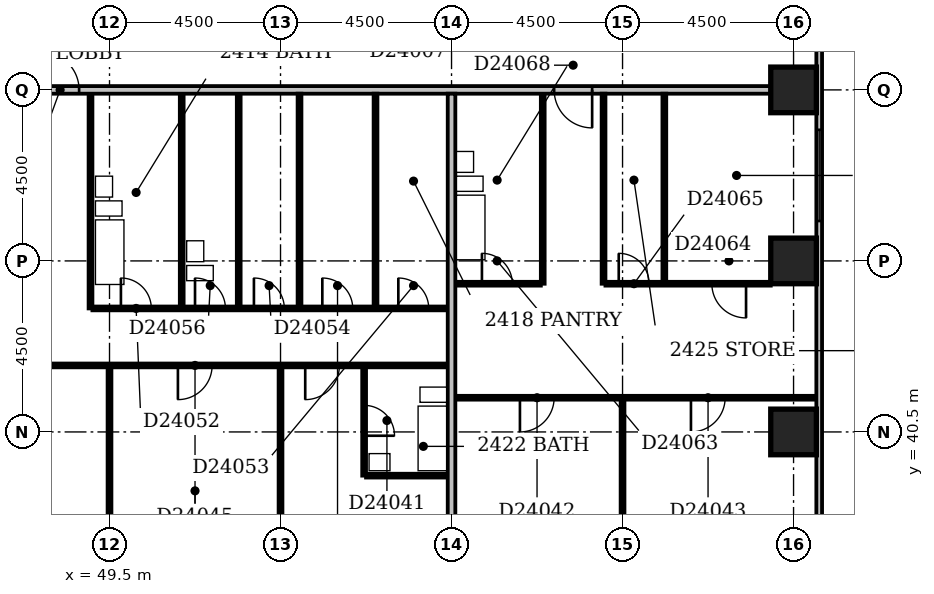
"""IFC4 building model, lengths in metres.
Left out: names, types, materials, properties, quantities, classifications, styles, units other than length and angle.
Written with IfcOpenShell. Run it as: python <this file> out.ifc"""

import sys

from ifc_helpers import new_model, si_unit, direction, frame, frame_2d, origin, origin_2d, place, context, subcontext, project, spatial, rectangle, extrude, element, fill, save


model = new_model("IFC4")
c1 = context("Model", 3, precision=1e-05, world=origin(), true_north=direction((0.0, 1.0)))
c2 = subcontext(c1, "Body", "Model", "MODEL_VIEW")
j1 = project(units=[si_unit("LENGTHUNIT", "METRE"), si_unit("PLANEANGLEUNIT", "RADIAN")], contexts=[c1])
p1 = place(None, origin())
s1 = spatial("IfcSite", under=j1, at=p1, CompositionType="ELEMENT")
p2 = place(p1, origin())
s2 = spatial("IfcBuilding", under=s1, at=p2, CompositionType="ELEMENT")
p3 = place(p2, frame((0.0, 0.0, 97.4)))
s3 = spatial("IfcBuildingStorey", under=s2, at=p3, CompositionType="ELEMENT", Elevation=97.4)
for number, where, z_axis, x_axis in (
    (1, (67.5, 40.5, -0.3), (0.0, 0.0, 1.0), (1.0, 0.0, 0.0)),
    (2, (67.5, 45.0, -0.3), (0.0, 0.0, 1.0), (1.0, 0.0, 0.0)),
    (3, (67.5, 49.5, -0.3), (0.0, 0.0, 1.0), (1.0, 0.0, 0.0)),
):
    element("IfcColumn", number, at=place(p3, frame(where, z_axis=z_axis, x_axis=x_axis)), inside=s3, PredefinedType="COLUMN", context=c2, shape_type="SweptSolid", body=[
        extrude(rectangle(XDim=1.2, YDim=1.2, at=origin_2d()), origin(), (0.0, 0.0, 1.0), 3.6),
    ])
p4 = place(p3, frame((68.175, 35.4, 0.0), z_axis=(0.0, 0.0, 1.0), x_axis=(0.0, 1.0, 0.0)))
e4 = element("IfcWall", 4, at=p4, inside=s3, PredefinedType="STANDARD", context=c2, shape_type="SweptSolid", body=[
    extrude(rectangle(XDim=23.85, YDim=0.15, at=frame_2d((11.925, 0.0))), origin(), (0.0, 0.0, 1.0), 2.7),
])
p5 = place(p4, frame((1.474, 0.0, 0.6)))
e5 = element("IfcOpeningElement", 5, at=p5, cuts=e4, PredefinedType="OPENING", context=c2, shape_type="SweptSolid", body=[
    extrude(rectangle(XDim=1.2, YDim=1.8, at=frame_2d((0.6, 0.9))), frame((0.0, 0.087, 0.0), z_axis=(0.0, -1.0, 0.0), x_axis=(1.0, 0.0, 0.0)), (0.0, 0.0, 1.0), 0.174),
])
p6 = place(p4, frame((10.65, 0.0, 0.6)))
e6 = element("IfcOpeningElement", 6, at=p6, cuts=e4, PredefinedType="OPENING", context=c2, shape_type="SweptSolid", body=[
    extrude(rectangle(XDim=2.4, YDim=1.8, at=frame_2d((1.2, 0.9))), frame((0.0, 0.087, 0.0), z_axis=(0.0, -1.0, 0.0), x_axis=(1.0, 0.0, 0.0)), (0.0, 0.0, 1.0), 0.174),
])
p7 = place(p4, frame((19.498, 0.0, 0.6)))
e7 = element("IfcOpeningElement", 7, at=p7, cuts=e4, PredefinedType="OPENING", context=c2, shape_type="SweptSolid", body=[
    extrude(rectangle(XDim=0.9, YDim=1.8, at=frame_2d((0.45, 0.9))), frame((0.0, 0.087, 0.0), z_axis=(0.0, -1.0, 0.0), x_axis=(1.0, 0.0, 0.0)), (0.0, 0.0, 1.0), 0.174),
])
p8 = place(p4, frame((21.806, 0.0, 0.6)))
e8 = element("IfcOpeningElement", 8, at=p8, cuts=e4, PredefinedType="OPENING", context=c2, shape_type="SweptSolid", body=[
    extrude(rectangle(XDim=0.45, YDim=1.8, at=frame_2d((0.225, 0.9))), frame((0.0, 0.087, 0.0), z_axis=(0.0, -1.0, 0.0), x_axis=(1.0, 0.0, 0.0)), (0.0, 0.0, 1.0), 0.174),
])
p9 = place(p3, frame((49.5, 36.6, 0.0), z_axis=(0.0, 0.0, 1.0), x_axis=(0.0, 1.0, 0.0)))
e9 = element("IfcWall", 9, at=p9, inside=s3, PredefinedType="PARTITIONING", context=c2, shape_type="SweptSolid", body=[
    extrude(rectangle(XDim=5.6, YDim=0.1, at=frame_2d((2.8, 0.0))), origin(), (0.0, 0.0, 1.0), 3.3),
])
p10 = place(p3, frame((54.0, 36.6, 0.0), z_axis=(0.0, 0.0, 1.0), x_axis=(0.0, 1.0, 0.0)))
e10 = element("IfcWall", 10, at=p10, inside=s3, PredefinedType="PARTITIONING", context=c2, shape_type="SweptSolid", body=[
    extrude(rectangle(XDim=5.6, YDim=0.1, at=frame_2d((2.8, 0.0))), origin(), (0.0, 0.0, 1.0), 2.6),
])
p11 = place(p3, frame((58.5, 36.6, 0.0), z_axis=(0.0, 0.0, 1.0), x_axis=(0.0, 1.0, 0.0)))
e11 = element("IfcWall", 11, at=p11, inside=s3, PredefinedType="PARTITIONING", context=c2, shape_type="SweptSolid", body=[
    extrude(rectangle(XDim=12.8, YDim=0.2, at=frame_2d((6.4, 0.0))), origin(), (0.0, 0.0, 1.0), 3.3),
])
p12 = place(p3, frame((63.0, 36.6, 0.0), z_axis=(0.0, 0.0, 1.0), x_axis=(0.0, 1.0, 0.0)))
e12 = element("IfcWall", 12, at=p12, inside=s3, PredefinedType="PARTITIONING", context=c2, shape_type="SweptSolid", body=[
    extrude(rectangle(XDim=4.75, YDim=0.1, at=frame_2d((2.375, 0.0))), origin(), (0.0, 0.0, 1.0), 2.4),
])
p13 = place(p3, frame((56.2, 39.35, 0.0), z_axis=(0.0, 0.0, 1.0), x_axis=(0.0, 1.0, 0.0)))
e13 = element("IfcWall", 13, at=p13, inside=s3, PredefinedType="PLUMBINGWALL", context=c2, shape_type="SweptSolid", body=[
    extrude(rectangle(XDim=2.85, YDim=0.1, at=frame_2d((1.425, 0.0))), origin(), (0.0, 0.0, 1.0), 3.3),
])
p14 = place(p13, frame((1.05, 0.0, 0.0)))
e14 = element("IfcOpeningElement", 14, at=p14, cuts=e13, PredefinedType="OPENING", context=c2, shape_type="SweptSolid", body=[
    extrude(rectangle(XDim=0.8, YDim=2.1, at=frame_2d((0.4, 1.05))), frame((0.0, 0.062, 0.0), z_axis=(0.0, -1.0, 0.0), x_axis=(1.0, 0.0, 0.0)), (0.0, 0.0, 1.0), 0.124),
])
p15 = place(p3, frame((56.25, 39.35, 0.0), z_axis=(0.0, 0.0, 1.0), x_axis=(1.0, 0.0, 0.0)))
e15 = element("IfcWall", 15, at=p15, inside=s3, PredefinedType="PLUMBINGWALL", context=c2, shape_type="SweptSolid", body=[
    extrude(rectangle(XDim=2.15, YDim=0.1, at=frame_2d((1.075, 0.0))), origin(), (0.0, 0.0, 1.0), 3.3),
])
p16 = place(p3, frame((58.6, 41.4, 0.0), z_axis=(0.0, 0.0, 1.0), x_axis=(1.0, 0.0, 0.0)))
e16 = element("IfcWall", 16, at=p16, inside=s3, PredefinedType="PARTITIONING", context=c2, shape_type="SweptSolid", body=[
    extrude(rectangle(XDim=9.5, YDim=0.1, at=frame_2d((4.75, 0.0))), origin(), (0.0, 0.0, 1.0), 3.3),
])
p17 = place(p16, frame((1.7, 0.0, 0.0)))
e17 = element("IfcOpeningElement", 17, at=p17, cuts=e16, PredefinedType="OPENING", context=c2, shape_type="SweptSolid", body=[
    extrude(rectangle(XDim=0.9, YDim=2.1, at=frame_2d((0.45, 1.05))), frame((0.0, 0.062, 0.0), z_axis=(0.0, -1.0, 0.0), x_axis=(1.0, 0.0, 0.0)), (0.0, 0.0, 1.0), 0.124),
])
p18 = place(p16, frame((6.2, 0.0, 0.0)))
e18 = element("IfcOpeningElement", 18, at=p18, cuts=e16, PredefinedType="OPENING", context=c2, shape_type="SweptSolid", body=[
    extrude(rectangle(XDim=0.9, YDim=2.1, at=frame_2d((0.45, 1.05))), frame((0.0, 0.062, 0.0), z_axis=(0.0, -1.0, 0.0), x_axis=(1.0, 0.0, 0.0)), (0.0, 0.0, 1.0), 0.124),
])
p19 = place(p3, frame((40.6, 42.25, 0.0), z_axis=(0.0, 0.0, 1.0), x_axis=(1.0, 0.0, 0.0)))
e19 = element("IfcWall", 19, at=p19, inside=s3, PredefinedType="PARTITIONING", context=c2, shape_type="SweptSolid", body=[
    extrude(rectangle(XDim=17.8, YDim=0.1, at=frame_2d((8.9, 0.0))), origin(), (0.0, 0.0, 1.0), 3.3),
])
p20 = place(p19, frame((3.9, 0.0, 0.0)))
e20 = element("IfcOpeningElement", 20, at=p20, cuts=e19, PredefinedType="OPENING", context=c2, shape_type="SweptSolid", body=[
    extrude(rectangle(XDim=0.9, YDim=2.1, at=frame_2d((0.45, 1.05))), frame((0.0, 0.062, 0.0), z_axis=(0.0, -1.0, 0.0), x_axis=(1.0, 0.0, 0.0)), (0.0, 0.0, 1.0), 0.124),
])
p21 = place(p19, frame((10.7, 0.0, 0.0)))
e21 = element("IfcOpeningElement", 21, at=p21, cuts=e19, PredefinedType="OPENING", context=c2, shape_type="SweptSolid", body=[
    extrude(rectangle(XDim=0.9, YDim=2.1, at=frame_2d((0.45, 1.05))), frame((0.0, 0.062, 0.0), z_axis=(0.0, -1.0, 0.0), x_axis=(1.0, 0.0, 0.0)), (0.0, 0.0, 1.0), 0.124),
])
p22 = place(p19, frame((14.05, 0.0, 0.0)))
e22 = element("IfcOpeningElement", 22, at=p22, cuts=e19, PredefinedType="OPENING", context=c2, shape_type="SweptSolid", body=[
    extrude(rectangle(XDim=0.9, YDim=2.1, at=frame_2d((0.45, 1.05))), frame((0.0, 0.062, 0.0), z_axis=(0.0, -1.0, 0.0), x_axis=(1.0, 0.0, 0.0)), (0.0, 0.0, 1.0), 0.124),
])
p23 = place(p3, frame((49.0, 43.75, 0.0), z_axis=(0.0, 0.0, 1.0), x_axis=(0.0, 1.0, 0.0)))
e23 = element("IfcWall", 23, at=p23, inside=s3, PredefinedType="PLUMBINGWALL", context=c2, shape_type="SweptSolid", body=[
    extrude(rectangle(XDim=5.65, YDim=0.1, at=frame_2d((2.825, 0.0))), origin(), (0.0, 0.0, 1.0), 3.3),
])
p24 = place(p3, frame((49.05, 43.75, 0.0), z_axis=(0.0, 0.0, 1.0), x_axis=(1.0, 0.0, 0.0)))
e24 = element("IfcWall", 24, at=p24, inside=s3, PredefinedType="PARTITIONING", context=c2, shape_type="SweptSolid", body=[
    extrude(rectangle(XDim=9.35, YDim=0.1, at=frame_2d((4.675, 0.0))), origin(), (0.0, 0.0, 1.0), 3.3),
])
p25 = place(p24, frame((0.75, 0.0, 0.0)))
e25 = element("IfcOpeningElement", 25, at=p25, cuts=e24, PredefinedType="OPENING", context=c2, shape_type="SweptSolid", body=[
    extrude(rectangle(XDim=0.8, YDim=2.1, at=frame_2d((0.4, 1.05))), frame((0.0, 0.062, 0.0), z_axis=(0.0, -1.0, 0.0), x_axis=(1.0, 0.0, 0.0)), (0.0, 0.0, 1.0), 0.124),
])
p26 = place(p24, frame((8.05, 0.0, 0.0)))
e26 = element("IfcOpeningElement", 26, at=p26, cuts=e24, PredefinedType="OPENING", context=c2, shape_type="SweptSolid", body=[
    extrude(rectangle(XDim=0.8, YDim=2.1, at=frame_2d((0.4, 1.05))), frame((0.0, 0.062, 0.0), z_axis=(0.0, -1.0, 0.0), x_axis=(1.0, 0.0, 0.0)), (0.0, 0.0, 1.0), 0.124),
])
p27 = place(p24, frame((4.25, 0.0, 0.0)))
e27 = element("IfcOpeningElement", 27, at=p27, cuts=e24, PredefinedType="OPENING", context=c2, shape_type="SweptSolid", body=[
    extrude(rectangle(XDim=0.8, YDim=2.1, at=frame_2d((0.4, 1.05))), frame((0.0, 0.062, 0.0), z_axis=(0.0, -1.0, 0.0), x_axis=(1.0, 0.0, 0.0)), (0.0, 0.0, 1.0), 0.124),
])
p28 = place(p24, frame((6.05, 0.0, 0.0)))
e28 = element("IfcOpeningElement", 28, at=p28, cuts=e24, PredefinedType="OPENING", context=c2, shape_type="SweptSolid", body=[
    extrude(rectangle(XDim=0.8, YDim=2.1, at=frame_2d((0.4, 1.05))), frame((0.0, 0.062, 0.0), z_axis=(0.0, -1.0, 0.0), x_axis=(1.0, 0.0, 0.0)), (0.0, 0.0, 1.0), 0.124),
])
p29 = place(p24, frame((2.7, 0.0, 0.0)))
e29 = element("IfcOpeningElement", 29, at=p29, cuts=e24, PredefinedType="OPENING", context=c2, shape_type="SweptSolid", body=[
    extrude(rectangle(XDim=0.8, YDim=2.1, at=frame_2d((0.4, 1.05))), frame((0.0, 0.062, 0.0), z_axis=(0.0, -1.0, 0.0), x_axis=(1.0, 0.0, 0.0)), (0.0, 0.0, 1.0), 0.124),
])
for number, where, z_axis, x_axis in (
    (30, (51.4, 43.8, 0.0), (0.0, 0.0, 1.0), (0.0, 1.0, 0.0)),
    (31, (52.9, 43.8, 0.0), (0.0, 0.0, 1.0), (0.0, 1.0, 0.0)),
):
    element("IfcWall", number, at=place(p3, frame(where, z_axis=z_axis, x_axis=x_axis)), inside=s3, PredefinedType="PLUMBINGWALL", context=c2, shape_type="SweptSolid", body=[
        extrude(rectangle(XDim=5.6, YDim=0.1, at=frame_2d((2.8, 0.0))), origin(), (0.0, 0.0, 1.0), 3.3),
    ])
p30 = place(p3, frame((54.5, 43.8, 0.0), z_axis=(0.0, 0.0, 1.0), x_axis=(0.0, 1.0, 0.0)))
e32 = element("IfcWall", 32, at=p30, inside=s3, PredefinedType="PARTITIONING", context=c2, shape_type="SweptSolid", body=[
    extrude(rectangle(XDim=5.6, YDim=0.1, at=frame_2d((2.8, 0.0))), origin(), (0.0, 0.0, 1.0), 2.6),
])
p31 = place(p3, frame((56.5, 43.8, 0.0), z_axis=(0.0, 0.0, 1.0), x_axis=(0.0, 1.0, 0.0)))
e33 = element("IfcWall", 33, at=p31, inside=s3, PredefinedType="PARTITIONING", context=c2, shape_type="SweptSolid", body=[
    extrude(rectangle(XDim=5.6, YDim=0.1, at=frame_2d((2.8, 0.0))), origin(), (0.0, 0.0, 1.0), 3.3),
])
p32 = place(p3, frame((58.6, 44.4, 0.0), z_axis=(0.0, 0.0, 1.0), x_axis=(1.0, 0.0, 0.0)))
e34 = element("IfcWall", 34, at=p32, inside=s3, PredefinedType="PARTITIONING", context=c2, shape_type="SweptSolid", body=[
    extrude(rectangle(XDim=2.25, YDim=0.1, at=frame_2d((1.125, 0.0))), origin(), (0.0, 0.0, 1.0), 3.3),
])
p33 = place(p32, frame((0.7, 0.0, 0.0)))
e35 = element("IfcOpeningElement", 35, at=p33, cuts=e34, PredefinedType="OPENING", context=c2, shape_type="SweptSolid", body=[
    extrude(rectangle(XDim=0.8, YDim=2.1, at=frame_2d((0.4, 1.05))), frame((0.0, 0.062, 0.0), z_axis=(0.0, -1.0, 0.0), x_axis=(1.0, 0.0, 0.0)), (0.0, 0.0, 1.0), 0.124),
])
p34 = place(p3, frame((60.9, 44.4, 0.0), z_axis=(0.0, 0.0, 1.0), x_axis=(0.0, 1.0, 0.0)))
e36 = element("IfcWall", 36, at=p34, inside=s3, PredefinedType="PLUMBINGWALL", context=c2, shape_type="SweptSolid", body=[
    extrude(rectangle(XDim=5.0, YDim=0.1, at=frame_2d((2.5, 0.0))), origin(), (0.0, 0.0, 1.0), 3.3),
])
p35 = place(p3, frame((62.5, 44.4, 0.0), z_axis=(0.0, 0.0, 1.0), x_axis=(0.0, 1.0, 0.0)))
e37 = element("IfcWall", 37, at=p35, inside=s3, PredefinedType="PARTITIONING", context=c2, shape_type="SweptSolid", body=[
    extrude(rectangle(XDim=5.0, YDim=0.1, at=frame_2d((2.5, 0.0))), origin(), (0.0, 0.0, 1.0), 2.4),
])
p36 = place(p3, frame((62.55, 44.4, 0.0), z_axis=(0.0, 0.0, 1.0), x_axis=(1.0, 0.0, 0.0)))
e38 = element("IfcWall", 38, at=p36, inside=s3, PredefinedType="PARTITIONING", context=c2, shape_type="SweptSolid", body=[
    extrude(rectangle(XDim=4.35, YDim=0.1, at=frame_2d((2.175, 0.0))), origin(), (0.0, 0.0, 1.0), 3.3),
])
p37 = place(p36, frame((2.8, 0.0, 0.0)))
e39 = element("IfcOpeningElement", 39, at=p37, cuts=e38, PredefinedType="OPENING", context=c2, shape_type="SweptSolid", body=[
    extrude(rectangle(XDim=0.9, YDim=2.1, at=frame_2d((0.45, 1.05))), frame((0.0, 0.062, 0.0), z_axis=(0.0, -1.0, 0.0), x_axis=(1.0, 0.0, 0.0)), (0.0, 0.0, 1.0), 0.124),
])
p38 = place(p36, frame((0.35, 0.0, 0.0)))
e40 = element("IfcOpeningElement", 40, at=p38, cuts=e38, PredefinedType="OPENING", context=c2, shape_type="SweptSolid", body=[
    extrude(rectangle(XDim=0.8, YDim=2.1, at=frame_2d((0.4, 1.05))), frame((0.0, 0.062, 0.0), z_axis=(0.0, -1.0, 0.0), x_axis=(1.0, 0.0, 0.0)), (0.0, 0.0, 1.0), 0.124),
])
p39 = place(p3, frame((64.1, 44.45, 0.0), z_axis=(0.0, 0.0, 1.0), x_axis=(0.0, 1.0, 0.0)))
e41 = element("IfcWall", 41, at=p39, inside=s3, PredefinedType="PARTITIONING", context=c2, shape_type="SweptSolid", body=[
    extrude(rectangle(XDim=4.95, YDim=0.1, at=frame_2d((2.475, 0.0))), origin(), (0.0, 0.0, 1.0), 3.3),
])
p40 = place(p3, frame((9.1, 49.5, 0.0), z_axis=(0.0, 0.0, 1.0), x_axis=(1.0, 0.0, 0.0)))
e42 = element("IfcWall", 42, at=p40, inside=s3, PredefinedType="PARTITIONING", context=c2, shape_type="SweptSolid", body=[
    extrude(rectangle(XDim=57.8, YDim=0.2, at=frame_2d((28.9, 0.0))), origin(), (0.0, 0.0, 1.0), 3.3),
])
p41 = place(p40, frame((13.7, 0.0, 0.0)))
e43 = element("IfcOpeningElement", 43, at=p41, cuts=e42, PredefinedType="OPENING", context=c2, shape_type="SweptSolid", body=[
    extrude(rectangle(XDim=1.0, YDim=2.1, at=frame_2d((0.5, 1.05))), frame((0.0, 0.112, 0.0), z_axis=(0.0, -1.0, 0.0), x_axis=(1.0, 0.0, 0.0)), (0.0, 0.0, 1.0), 0.224),
])
p42 = place(p40, frame((38.6, 0.0, 0.0)))
e44 = element("IfcOpeningElement", 44, at=p42, cuts=e42, PredefinedType="OPENING", context=c2, shape_type="SweptSolid", body=[
    extrude(rectangle(XDim=1.0, YDim=2.1, at=frame_2d((0.5, 1.05))), frame((0.0, 0.112, 0.0), z_axis=(0.0, -1.0, 0.0), x_axis=(1.0, 0.0, 0.0)), (0.0, 0.0, 1.0), 0.224),
])
p43 = place(p40, frame((52.1, 0.0, 0.0)))
e45 = element("IfcOpeningElement", 45, at=p43, cuts=e42, PredefinedType="OPENING", context=c2, shape_type="SweptSolid", body=[
    extrude(rectangle(XDim=1.0, YDim=2.1, at=frame_2d((0.5, 1.05))), frame((0.0, 0.112, 0.0), z_axis=(0.0, -1.0, 0.0), x_axis=(1.0, 0.0, 0.0)), (0.0, 0.0, 1.0), 0.224),
])
p44 = place(p40, frame((6.15, 0.0, 0.0)))
e46 = element("IfcOpeningElement", 46, at=p44, cuts=e42, PredefinedType="OPENING", context=c2, shape_type="SweptSolid", body=[
    extrude(rectangle(XDim=0.9, YDim=2.1, at=frame_2d((0.45, 1.05))), frame((0.0, 0.112, 0.0), z_axis=(0.0, -1.0, 0.0), x_axis=(1.0, 0.0, 0.0)), (0.0, 0.0, 1.0), 0.224),
])
p45 = place(p40, frame((10.65, 0.0, 0.0)))
e47 = element("IfcOpeningElement", 47, at=p45, cuts=e42, PredefinedType="OPENING", context=c2, shape_type="SweptSolid", body=[
    extrude(rectangle(XDim=0.9, YDim=2.1, at=frame_2d((0.45, 1.05))), frame((0.0, 0.112, 0.0), z_axis=(0.0, -1.0, 0.0), x_axis=(1.0, 0.0, 0.0)), (0.0, 0.0, 1.0), 0.224),
])
p46 = place(p6, origin())
e48 = element("IfcWindow", 48, at=p46, inside=s3, PartitioningType="SINGLE_PANEL", PredefinedType="WINDOW", context=c2, shape_type="SweptSolid", body=[
    extrude(rectangle(XDim=2.4, YDim=1.8, at=frame_2d((1.2, 0.9))), frame((0.0, 0.03, 0.0), z_axis=(0.0, -1.0, 0.0), x_axis=(1.0, 0.0, 0.0)), (0.0, 0.0, 1.0), 0.06),
])
fill(e6, e48)
p47 = place(p14, frame((0.8, 0.0, 0.0), z_axis=(0.0, 0.0, 1.0), x_axis=(-1.0, 0.0, 0.0)))
e49 = element("IfcDoor", 49, at=p47, inside=s3, OperationType="SINGLE_SWING_RIGHT", PredefinedType="DOOR", context=c2, shape_type="SweptSolid", body=[
    extrude(rectangle(XDim=0.8, YDim=2.1, at=frame_2d((0.4, 1.05))), frame((0.0, 0.025, 0.0), z_axis=(0.0, -1.0, 0.0), x_axis=(1.0, 0.0, 0.0)), (0.0, 0.0, 1.0), 0.05),
])
fill(e14, e49)
p48 = place(p17, frame((0.9, 0.0, 0.0), z_axis=(0.0, 0.0, 1.0), x_axis=(-1.0, 0.0, 0.0)))
e50 = element("IfcDoor", 50, at=p48, inside=s3, OperationType="SINGLE_SWING_RIGHT", PredefinedType="DOOR", context=c2, shape_type="SweptSolid", body=[
    extrude(rectangle(XDim=0.9, YDim=2.1, at=frame_2d((0.45, 1.05))), frame((0.0, 0.025, 0.0), z_axis=(0.0, -1.0, 0.0), x_axis=(1.0, 0.0, 0.0)), (0.0, 0.0, 1.0), 0.05),
])
fill(e17, e50)
p49 = place(p18, frame((0.9, 0.0, 0.0), z_axis=(0.0, 0.0, 1.0), x_axis=(-1.0, 0.0, 0.0)))
e51 = element("IfcDoor", 51, at=p49, inside=s3, OperationType="SINGLE_SWING_RIGHT", PredefinedType="DOOR", context=c2, shape_type="SweptSolid", body=[
    extrude(rectangle(XDim=0.9, YDim=2.1, at=frame_2d((0.45, 1.05))), frame((0.0, 0.025, 0.0), z_axis=(0.0, -1.0, 0.0), x_axis=(1.0, 0.0, 0.0)), (0.0, 0.0, 1.0), 0.05),
])
fill(e18, e51)
p50 = place(p21, frame((0.9, 0.0, 0.0), z_axis=(0.0, 0.0, 1.0), x_axis=(-1.0, 0.0, 0.0)))
e52 = element("IfcDoor", 52, at=p50, inside=s3, OperationType="SINGLE_SWING_RIGHT", PredefinedType="DOOR", context=c2, shape_type="SweptSolid", body=[
    extrude(rectangle(XDim=0.9, YDim=2.1, at=frame_2d((0.45, 1.05))), frame((0.0, 0.025, 0.0), z_axis=(0.0, -1.0, 0.0), x_axis=(1.0, 0.0, 0.0)), (0.0, 0.0, 1.0), 0.05),
])
fill(e21, e52)
p51 = place(p22, frame((0.9, 0.0, 0.0), z_axis=(0.0, 0.0, 1.0), x_axis=(-1.0, 0.0, 0.0)))
e53 = element("IfcDoor", 53, at=p51, inside=s3, OperationType="SINGLE_SWING_RIGHT", PredefinedType="DOOR", context=c2, shape_type="SweptSolid", body=[
    extrude(rectangle(XDim=0.9, YDim=2.1, at=frame_2d((0.45, 1.05))), frame((0.0, 0.025, 0.0), z_axis=(0.0, -1.0, 0.0), x_axis=(1.0, 0.0, 0.0)), (0.0, 0.0, 1.0), 0.05),
])
fill(e22, e53)
p52 = place(p25, origin())
e54 = element("IfcDoor", 54, at=p52, inside=s3, OperationType="SINGLE_SWING_LEFT", PredefinedType="DOOR", context=c2, shape_type="SweptSolid", body=[
    extrude(rectangle(XDim=0.8, YDim=2.1, at=frame_2d((0.4, 1.05))), frame((0.0, 0.025, 0.0), z_axis=(0.0, -1.0, 0.0), x_axis=(1.0, 0.0, 0.0)), (0.0, 0.0, 1.0), 0.05),
])
fill(e25, e54)
p53 = place(p26, origin())
e55 = element("IfcDoor", 55, at=p53, inside=s3, OperationType="SINGLE_SWING_LEFT", PredefinedType="DOOR", context=c2, shape_type="SweptSolid", body=[
    extrude(rectangle(XDim=0.8, YDim=2.1, at=frame_2d((0.4, 1.05))), frame((0.0, 0.025, 0.0), z_axis=(0.0, -1.0, 0.0), x_axis=(1.0, 0.0, 0.0)), (0.0, 0.0, 1.0), 0.05),
])
fill(e26, e55)
p54 = place(p27, origin())
e56 = element("IfcDoor", 56, at=p54, inside=s3, OperationType="SINGLE_SWING_LEFT", PredefinedType="DOOR", context=c2, shape_type="SweptSolid", body=[
    extrude(rectangle(XDim=0.8, YDim=2.1, at=frame_2d((0.4, 1.05))), frame((0.0, 0.025, 0.0), z_axis=(0.0, -1.0, 0.0), x_axis=(1.0, 0.0, 0.0)), (0.0, 0.0, 1.0), 0.05),
])
fill(e27, e56)
p55 = place(p28, origin())
e57 = element("IfcDoor", 57, at=p55, inside=s3, OperationType="SINGLE_SWING_LEFT", PredefinedType="DOOR", context=c2, shape_type="SweptSolid", body=[
    extrude(rectangle(XDim=0.8, YDim=2.1, at=frame_2d((0.4, 1.05))), frame((0.0, 0.025, 0.0), z_axis=(0.0, -1.0, 0.0), x_axis=(1.0, 0.0, 0.0)), (0.0, 0.0, 1.0), 0.05),
])
fill(e28, e57)
p56 = place(p29, origin())
e58 = element("IfcDoor", 58, at=p56, inside=s3, OperationType="SINGLE_SWING_LEFT", PredefinedType="DOOR", context=c2, shape_type="SweptSolid", body=[
    extrude(rectangle(XDim=0.8, YDim=2.1, at=frame_2d((0.4, 1.05))), frame((0.0, 0.025, 0.0), z_axis=(0.0, -1.0, 0.0), x_axis=(1.0, 0.0, 0.0)), (0.0, 0.0, 1.0), 0.05),
])
fill(e29, e58)
p57 = place(p33, origin())
e59 = element("IfcDoor", 59, at=p57, inside=s3, OperationType="SINGLE_SWING_LEFT", PredefinedType="DOOR", context=c2, shape_type="SweptSolid", body=[
    extrude(rectangle(XDim=0.8, YDim=2.1, at=frame_2d((0.4, 1.05))), frame((0.0, 0.025, 0.0), z_axis=(0.0, -1.0, 0.0), x_axis=(1.0, 0.0, 0.0)), (0.0, 0.0, 1.0), 0.05),
])
fill(e35, e59)
p58 = place(p37, origin())
e60 = element("IfcDoor", 60, at=p58, inside=s3, OperationType="SINGLE_SWING_RIGHT", PredefinedType="DOOR", context=c2, shape_type="SweptSolid", body=[
    extrude(rectangle(XDim=0.9, YDim=2.1, at=frame_2d((0.45, 1.05))), frame((0.0, 0.025, 0.0), z_axis=(0.0, -1.0, 0.0), x_axis=(1.0, 0.0, 0.0)), (0.0, 0.0, 1.0), 0.05),
])
fill(e39, e60)
p59 = place(p38, origin())
e61 = element("IfcDoor", 61, at=p59, inside=s3, OperationType="SINGLE_SWING_LEFT", PredefinedType="DOOR", context=c2, shape_type="SweptSolid", body=[
    extrude(rectangle(XDim=0.8, YDim=2.1, at=frame_2d((0.4, 1.05))), frame((0.0, 0.025, 0.0), z_axis=(0.0, -1.0, 0.0), x_axis=(1.0, 0.0, 0.0)), (0.0, 0.0, 1.0), 0.05),
])
fill(e40, e61)
p60 = place(p42, origin())
e62 = element("IfcDoor", 62, at=p60, inside=s3, OperationType="SINGLE_SWING_LEFT", PredefinedType="DOOR", context=c2, shape_type="SweptSolid", body=[
    extrude(rectangle(XDim=1.0, YDim=2.1, at=frame_2d((0.5, 1.05))), frame((0.0, 0.025, 0.0), z_axis=(0.0, -1.0, 0.0), x_axis=(1.0, 0.0, 0.0)), (0.0, 0.0, 1.0), 0.05),
])
fill(e44, e62)
p61 = place(p43, origin())
e63 = element("IfcDoor", 63, at=p61, inside=s3, OperationType="SINGLE_SWING_RIGHT", PredefinedType="DOOR", context=c2, shape_type="SweptSolid", body=[
    extrude(rectangle(XDim=1.0, YDim=2.1, at=frame_2d((0.5, 1.05))), frame((0.0, 0.025, 0.0), z_axis=(0.0, -1.0, 0.0), x_axis=(1.0, 0.0, 0.0)), (0.0, 0.0, 1.0), 0.05),
])
fill(e45, e63)
save(model, sys.argv[1])
